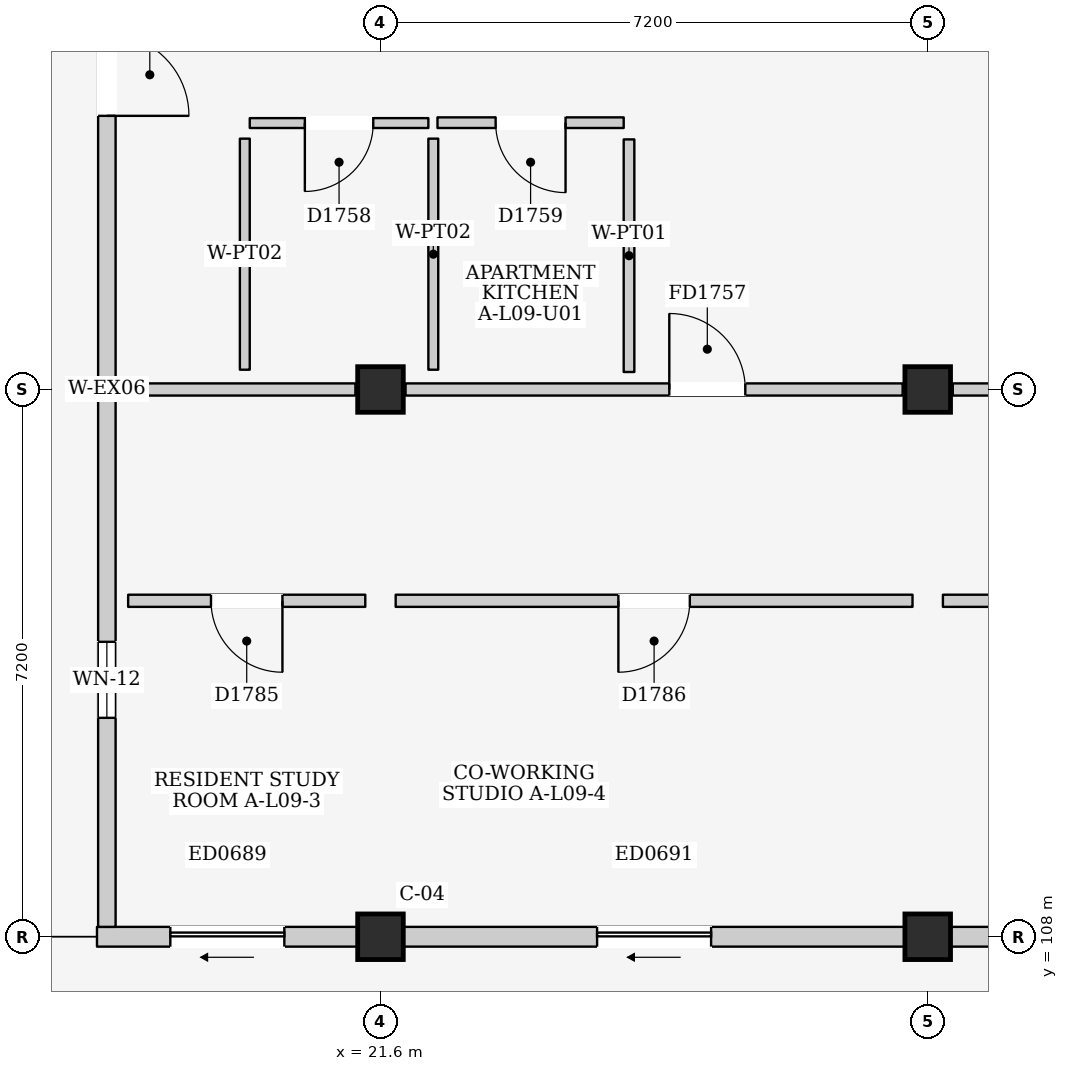
"""IFC4 building model, lengths in metres.
Left out: names, types, materials, properties, quantities, classifications, styles, units other than length and angle.
Written with IfcOpenShell. Run it as: python <this file> out.ifc"""

import sys

from ifc_helpers import new_model, si_unit, direction, frame, frame_2d, origin, origin_2d, place, context, subcontext, project, spatial, rectangle, extrude, element, fill, save


model = new_model("IFC4")
c1 = context("Model", 3, precision=1e-05, world=origin(), true_north=direction((0.0, 1.0)))
c2 = subcontext(c1, "Body", "Model", "MODEL_VIEW")
j1 = project(units=[si_unit("LENGTHUNIT", "METRE"), si_unit("PLANEANGLEUNIT", "RADIAN")], contexts=[c1])
p1 = place(None, origin())
s1 = spatial("IfcSite", under=j1, at=p1, CompositionType="ELEMENT")
p2 = place(p1, origin())
s2 = spatial("IfcBuilding", under=s1, at=p2, CompositionType="ELEMENT")
p3 = place(p2, frame((0.0, 0.0, 31.5)))
s3 = spatial("IfcBuildingStorey", under=s2, at=p3, CompositionType="ELEMENT", Elevation=31.5)
for number, where, z_axis, x_axis in (
    (1, (21.6, 108.0, 0.0), (0.0, 0.0, 1.0), (1.0, 0.0, 0.0)),
    (2, (21.6, 115.2, 0.0), (0.0, 0.0, 1.0), (1.0, 0.0, 0.0)),
    (3, (28.8, 108.0, 0.0), (0.0, 0.0, 1.0), (1.0, 0.0, 0.0)),
    (4, (28.8, 115.2, 0.0), (0.0, 0.0, 1.0), (1.0, 0.0, 0.0)),
):
    element("IfcColumn", number, at=place(p3, frame(where, z_axis=z_axis, x_axis=x_axis)), inside=s3, PredefinedType="COLUMN", context=c2, shape_type="SweptSolid", body=[
        extrude(rectangle(XDim=0.6, YDim=0.6, at=origin_2d()), origin(), (0.0, 0.0, 1.0), 3.3),
    ])
p4 = place(p3, frame((17.87, 108.0, 0.0), z_axis=(0.0, 0.0, 1.0), x_axis=(1.0, 0.0, 0.0)))
e5 = element("IfcWall", 5, at=p4, inside=s3, PredefinedType="ELEMENTEDWALL", context=c2, shape_type="SweptSolid", body=[
    extrude(rectangle(XDim=3.43, YDim=0.26, at=frame_2d((1.715, 0.0))), origin(), (0.0, 0.0, 1.0), 2.415),
])
p5 = place(p4, frame((0.965, 0.0, 0.0)))
e6 = element("IfcOpeningElement", 6, at=p5, cuts=e5, PredefinedType="OPENING", context=c2, shape_type="SweptSolid", body=[
    extrude(rectangle(XDim=1.5, YDim=2.12, at=frame_2d((0.75, 1.06))), frame((0.0, 0.145, 0.0), z_axis=(0.0, -1.0, 0.0), x_axis=(1.0, 0.0, 0.0)), (0.0, 0.0, 1.0), 0.29),
])
p6 = place(p3, frame((21.9, 108.0, 0.0), z_axis=(0.0, 0.0, 1.0), x_axis=(1.0, 0.0, 0.0)))
e7 = element("IfcWall", 7, at=p6, inside=s3, PredefinedType="ELEMENTEDWALL", context=c2, shape_type="SweptSolid", body=[
    extrude(rectangle(XDim=6.6, YDim=0.26, at=frame_2d((3.3, 0.0))), origin(), (0.0, 0.0, 1.0), 2.415),
])
p7 = place(p6, frame((2.55, 0.0, 0.0)))
e8 = element("IfcOpeningElement", 8, at=p7, cuts=e7, PredefinedType="OPENING", context=c2, shape_type="SweptSolid", body=[
    extrude(rectangle(XDim=1.5, YDim=2.12, at=frame_2d((0.75, 1.06))), frame((0.0, 0.145, 0.0), z_axis=(0.0, -1.0, 0.0), x_axis=(1.0, 0.0, 0.0)), (0.0, 0.0, 1.0), 0.29),
])
p8 = place(p3, frame((29.1, 108.0, 0.0), z_axis=(0.0, 0.0, 1.0), x_axis=(1.0, 0.0, 0.0)))
e9 = element("IfcWall", 9, at=p8, inside=s3, PredefinedType="ELEMENTEDWALL", context=c2, shape_type="SweptSolid", body=[
    extrude(rectangle(XDim=6.6, YDim=0.26, at=frame_2d((3.3, 0.0))), origin(), (0.0, 0.0, 1.0), 2.415),
])
p9 = place(p8, frame((2.55, 0.0, 0.0)))
e10 = element("IfcOpeningElement", 10, at=p9, cuts=e9, PredefinedType="OPENING", context=c2, shape_type="SweptSolid", body=[
    extrude(rectangle(XDim=1.5, YDim=2.12, at=frame_2d((0.75, 1.06))), frame((0.0, 0.145, 0.0), z_axis=(0.0, -1.0, 0.0), x_axis=(1.0, 0.0, 0.0)), (0.0, 0.0, 1.0), 0.29),
])
p10 = place(p3, frame((18.0, 108.13, 0.0), z_axis=(0.0, 0.0, 1.0), x_axis=(0.0, 1.0, 0.0)))
e11 = element("IfcWall", 11, at=p10, inside=s3, PredefinedType="ELEMENTEDWALL", context=c2, shape_type="SweptSolid", body=[
    extrude(rectangle(XDim=7.07, YDim=0.23, at=frame_2d((3.535, 0.0))), origin(), (0.0, 0.0, 1.0), 2.515),
])
p11 = place(p10, frame((2.75, 0.0, 1.1)))
e12 = element("IfcOpeningElement", 12, at=p11, cuts=e11, PredefinedType="OPENING", context=c2, shape_type="SweptSolid", body=[
    extrude(rectangle(XDim=1.0, YDim=0.9, at=frame_2d((0.5, 0.45))), frame((0.0, 0.13, 0.0), z_axis=(0.0, -1.0, 0.0), x_axis=(1.0, 0.0, 0.0)), (0.0, 0.0, 1.0), 0.26),
])
p12 = place(p3, frame((18.0, 115.2, 0.0), z_axis=(0.0, 0.0, 1.0), x_axis=(0.0, 1.0, 0.0)))
e13 = element("IfcWall", 13, at=p12, inside=s3, PredefinedType="ELEMENTEDWALL", context=c2, shape_type="SweptSolid", body=[
    extrude(rectangle(XDim=7.07, YDim=0.23, at=frame_2d((3.535, 0.0))), origin(), (0.0, 0.0, 1.0), 2.515),
])
p13 = place(p12, frame((3.6, 0.0, 0.0)))
e14 = element("IfcOpeningElement", 14, at=p13, cuts=e13, PredefinedType="OPENING", context=c2, shape_type="SweptSolid", body=[
    extrude(rectangle(XDim=1.08, YDim=2.12, at=frame_2d((0.54, 1.06))), frame((0.0, 0.13, 0.0), z_axis=(0.0, -1.0, 0.0), x_axis=(1.0, 0.0, 0.0)), (0.0, 0.0, 1.0), 0.26),
])
p14 = place(p3, frame((18.28, 115.2, 0.0), z_axis=(0.0, 0.0, 1.0), x_axis=(1.0, 0.0, 0.0)))
e15 = element("IfcWall", 15, at=p14, inside=s3, PredefinedType="PARTITIONING", context=c2, shape_type="SweptSolid", body=[
    extrude(rectangle(XDim=2.99, YDim=0.16, at=frame_2d((1.495, 0.0))), origin(), (0.0, 0.0, 1.0), 2.415),
])
p15 = place(p3, frame((21.93, 115.2, 0.0), z_axis=(0.0, 0.0, 1.0), x_axis=(1.0, 0.0, 0.0)))
e16 = element("IfcWall", 16, at=p15, inside=s3, PredefinedType="PARTITIONING", context=c2, shape_type="SweptSolid", body=[
    extrude(rectangle(XDim=6.54, YDim=0.16, at=frame_2d((3.27, 0.0))), origin(), (0.0, 0.0, 1.0), 2.415),
])
p16 = place(p15, frame((3.47, 0.0, 0.0)))
e17 = element("IfcOpeningElement", 17, at=p16, cuts=e16, PredefinedType="OPENING", context=c2, shape_type="SweptSolid", body=[
    extrude(rectangle(XDim=1.0, YDim=2.15, at=frame_2d((0.5, 1.075))), frame((0.0, 0.095, 0.0), z_axis=(0.0, -1.0, 0.0), x_axis=(1.0, 0.0, 0.0)), (0.0, 0.0, 1.0), 0.19),
])
p17 = place(p3, frame((29.13, 115.2, 0.0), z_axis=(0.0, 0.0, 1.0), x_axis=(1.0, 0.0, 0.0)))
e18 = element("IfcWall", 18, at=p17, inside=s3, PredefinedType="PARTITIONING", context=c2, shape_type="SweptSolid", body=[
    extrude(rectangle(XDim=6.54, YDim=0.16, at=frame_2d((3.27, 0.0))), origin(), (0.0, 0.0, 1.0), 2.415),
])
p18 = place(p3, frame((19.88, 118.705, 0.0), z_axis=(0.0, 0.0, 1.0), x_axis=(1.0, 0.0, 0.0)))
e19 = element("IfcWall", 19, at=p18, inside=s3, PredefinedType="PARTITIONING", context=c2, shape_type="SweptSolid", body=[
    extrude(rectangle(XDim=2.35, YDim=0.13, at=frame_2d((1.175, 0.0))), origin(), (0.0, 0.0, 1.0), 3.08),
])
p19 = place(p18, frame((0.725, 0.0, 0.0)))
e20 = element("IfcOpeningElement", 20, at=p19, cuts=e19, PredefinedType="OPENING", context=c2, shape_type="SweptSolid", body=[
    extrude(rectangle(XDim=0.9, YDim=2.1, at=frame_2d((0.45, 1.05))), frame((0.0, 0.08, 0.0), z_axis=(0.0, -1.0, 0.0), x_axis=(1.0, 0.0, 0.0)), (0.0, 0.0, 1.0), 0.16),
])
for number, where, z_axis, x_axis in (
    (21, (22.295, 115.46, 0.0), (0.0, 0.0, 1.0), (0.0, 1.0, 0.0)),
    (22, (19.815, 115.46, 0.0), (0.0, 0.0, 1.0), (0.0, 1.0, 0.0)),
):
    element("IfcWall", number, at=place(p3, frame(where, z_axis=z_axis, x_axis=x_axis)), inside=s3, PredefinedType="PARTITIONING", context=c2, shape_type="SweptSolid", body=[
        extrude(rectangle(XDim=3.04, YDim=0.13, at=frame_2d((1.52, 0.0))), origin(), (0.0, 0.0, 1.0), 3.08),
    ])
p20 = place(p3, frame((22.35, 118.71, 0.0), z_axis=(0.0, 0.0, 1.0), x_axis=(1.0, 0.0, 0.0)))
e23 = element("IfcWall", 23, at=p20, inside=s3, PredefinedType="PARTITIONING", context=c2, shape_type="SweptSolid", body=[
    extrude(rectangle(XDim=2.45, YDim=0.14, at=frame_2d((1.225, 0.0))), origin(), (0.0, 0.0, 1.0), 3.08),
])
p21 = place(p20, frame((0.765, 0.0, 0.0)))
e24 = element("IfcOpeningElement", 24, at=p21, cuts=e23, PredefinedType="OPENING", context=c2, shape_type="SweptSolid", body=[
    extrude(rectangle(XDim=0.92, YDim=2.1, at=frame_2d((0.46, 1.05))), frame((0.0, 0.085, 0.0), z_axis=(0.0, -1.0, 0.0), x_axis=(1.0, 0.0, 0.0)), (0.0, 0.0, 1.0), 0.17),
])
p22 = place(p3, frame((24.87, 115.43, 0.0), z_axis=(0.0, 0.0, 1.0), x_axis=(0.0, 1.0, 0.0)))
e25 = element("IfcWall", 25, at=p22, inside=s3, PredefinedType="PARTITIONING", context=c2, shape_type="SweptSolid", body=[
    extrude(rectangle(XDim=3.06, YDim=0.14, at=frame_2d((1.53, 0.0))), origin(), (0.0, 0.0, 1.0), 3.08),
])
p23 = place(p3, frame((18.28, 112.42, 0.0), z_axis=(0.0, 0.0, 1.0), x_axis=(1.0, 0.0, 0.0)))
e26 = element("IfcWall", 26, at=p23, inside=s3, PredefinedType="PARTITIONING", context=c2, shape_type="SweptSolid", body=[
    extrude(rectangle(XDim=3.12, YDim=0.16, at=frame_2d((1.56, 0.0))), origin(), (0.0, 0.0, 1.0), 3.08),
])
p24 = place(p23, frame((1.09, 0.0, 0.0)))
e27 = element("IfcOpeningElement", 27, at=p24, cuts=e26, PredefinedType="OPENING", context=c2, shape_type="SweptSolid", body=[
    extrude(rectangle(XDim=0.94, YDim=2.12, at=frame_2d((0.47, 1.06))), frame((0.0, 0.095, 0.0), z_axis=(0.0, -1.0, 0.0), x_axis=(1.0, 0.0, 0.0)), (0.0, 0.0, 1.0), 0.19),
])
p25 = place(p3, frame((21.8, 112.42, 0.0), z_axis=(0.0, 0.0, 1.0), x_axis=(1.0, 0.0, 0.0)))
e28 = element("IfcWall", 28, at=p25, inside=s3, PredefinedType="PARTITIONING", context=c2, shape_type="SweptSolid", body=[
    extrude(rectangle(XDim=6.8, YDim=0.16, at=frame_2d((3.4, 0.0))), origin(), (0.0, 0.0, 1.0), 3.08),
])
p26 = place(p25, frame((2.93, 0.0, 0.0)))
e29 = element("IfcOpeningElement", 29, at=p26, cuts=e28, PredefinedType="OPENING", context=c2, shape_type="SweptSolid", body=[
    extrude(rectangle(XDim=0.94, YDim=2.12, at=frame_2d((0.47, 1.06))), frame((0.0, 0.095, 0.0), z_axis=(0.0, -1.0, 0.0), x_axis=(1.0, 0.0, 0.0)), (0.0, 0.0, 1.0), 0.19),
])
p27 = place(p3, frame((29.0, 112.42, 0.0), z_axis=(0.0, 0.0, 1.0), x_axis=(1.0, 0.0, 0.0)))
e30 = element("IfcWall", 30, at=p27, inside=s3, PredefinedType="PARTITIONING", context=c2, shape_type="SweptSolid", body=[
    extrude(rectangle(XDim=6.8, YDim=0.16, at=frame_2d((3.4, 0.0))), origin(), (0.0, 0.0, 1.0), 3.08),
])
p28 = place(p27, frame((2.93, 0.0, 0.0)))
e31 = element("IfcOpeningElement", 31, at=p28, cuts=e30, PredefinedType="OPENING", context=c2, shape_type="SweptSolid", body=[
    extrude(rectangle(XDim=0.94, YDim=2.12, at=frame_2d((0.47, 1.06))), frame((0.0, 0.095, 0.0), z_axis=(0.0, -1.0, 0.0), x_axis=(1.0, 0.0, 0.0)), (0.0, 0.0, 1.0), 0.19),
])
p29 = place(p5, frame((1.5, 0.0, 0.0), z_axis=(0.0, 0.0, 1.0), x_axis=(-1.0, 0.0, 0.0)))
e32 = element("IfcDoor", 32, at=p29, inside=s3, OperationType="SLIDING_TO_LEFT", PredefinedType="DOOR", context=c2, shape_type="SweptSolid", body=[
    extrude(rectangle(XDim=1.5, YDim=2.12, at=frame_2d((0.75, 1.06))), frame((0.0, 0.025, 0.0), z_axis=(0.0, -1.0, 0.0), x_axis=(1.0, 0.0, 0.0)), (0.0, 0.0, 1.0), 0.05),
])
fill(e6, e32)
p30 = place(p7, frame((1.5, 0.0, 0.0), z_axis=(0.0, 0.0, 1.0), x_axis=(-1.0, 0.0, 0.0)))
e33 = element("IfcDoor", 33, at=p30, inside=s3, OperationType="SLIDING_TO_LEFT", PredefinedType="DOOR", context=c2, shape_type="SweptSolid", body=[
    extrude(rectangle(XDim=1.5, YDim=2.12, at=frame_2d((0.75, 1.06))), frame((0.0, 0.025, 0.0), z_axis=(0.0, -1.0, 0.0), x_axis=(1.0, 0.0, 0.0)), (0.0, 0.0, 1.0), 0.05),
])
fill(e8, e33)
p31 = place(p11, origin())
e34 = element("IfcWindow", 34, at=p31, inside=s3, PartitioningType="SINGLE_PANEL", PredefinedType="WINDOW", context=c2, shape_type="SweptSolid", body=[
    extrude(rectangle(XDim=1.0, YDim=0.9, at=frame_2d((0.5, 0.45))), frame((0.0, 0.03, 0.0), z_axis=(0.0, -1.0, 0.0), x_axis=(1.0, 0.0, 0.0)), (0.0, 0.0, 1.0), 0.06),
])
fill(e12, e34)
p32 = place(p13, frame((1.08, 0.0, 0.0), z_axis=(0.0, 0.0, 1.0), x_axis=(-1.0, 0.0, 0.0)))
e35 = element("IfcDoor", 35, at=p32, inside=s3, OperationType="SINGLE_SWING_RIGHT", PredefinedType="DOOR", context=c2, shape_type="SweptSolid", body=[
    extrude(rectangle(XDim=1.08, YDim=2.12, at=frame_2d((0.54, 1.06))), frame((0.0, 0.025, 0.0), z_axis=(0.0, -1.0, 0.0), x_axis=(1.0, 0.0, 0.0)), (0.0, 0.0, 1.0), 0.05),
])
fill(e14, e35)
p33 = place(p16, origin())
e36 = element("IfcDoor", 36, at=p33, inside=s3, OperationType="SINGLE_SWING_LEFT", PredefinedType="DOOR", context=c2, shape_type="SweptSolid", body=[
    extrude(rectangle(XDim=1.0, YDim=2.15, at=frame_2d((0.5, 1.075))), frame((0.0, 0.025, 0.0), z_axis=(0.0, -1.0, 0.0), x_axis=(1.0, 0.0, 0.0)), (0.0, 0.0, 1.0), 0.05),
])
fill(e17, e36)
p34 = place(p19, frame((0.9, 0.0, 0.0), z_axis=(0.0, 0.0, 1.0), x_axis=(-1.0, 0.0, 0.0)))
e37 = element("IfcDoor", 37, at=p34, inside=s3, OperationType="SINGLE_SWING_RIGHT", PredefinedType="DOOR", context=c2, shape_type="SweptSolid", body=[
    extrude(rectangle(XDim=0.9, YDim=2.1, at=frame_2d((0.45, 1.05))), frame((0.0, 0.025, 0.0), z_axis=(0.0, -1.0, 0.0), x_axis=(1.0, 0.0, 0.0)), (0.0, 0.0, 1.0), 0.05),
])
fill(e20, e37)
p35 = place(p21, frame((0.92, 0.0, 0.0), z_axis=(0.0, 0.0, 1.0), x_axis=(-1.0, 0.0, 0.0)))
e38 = element("IfcDoor", 38, at=p35, inside=s3, OperationType="SINGLE_SWING_LEFT", PredefinedType="DOOR", context=c2, shape_type="SweptSolid", body=[
    extrude(rectangle(XDim=0.92, YDim=2.1, at=frame_2d((0.46, 1.05))), frame((0.0, 0.025, 0.0), z_axis=(0.0, -1.0, 0.0), x_axis=(1.0, 0.0, 0.0)), (0.0, 0.0, 1.0), 0.05),
])
fill(e24, e38)
p36 = place(p24, frame((0.94, 0.0, 0.0), z_axis=(0.0, 0.0, 1.0), x_axis=(-1.0, 0.0, 0.0)))
e39 = element("IfcDoor", 39, at=p36, inside=s3, OperationType="SINGLE_SWING_LEFT", PredefinedType="DOOR", context=c2, shape_type="SweptSolid", body=[
    extrude(rectangle(XDim=0.94, YDim=2.12, at=frame_2d((0.47, 1.06))), frame((0.0, 0.025, 0.0), z_axis=(0.0, -1.0, 0.0), x_axis=(1.0, 0.0, 0.0)), (0.0, 0.0, 1.0), 0.05),
])
fill(e27, e39)
p37 = place(p26, frame((0.94, 0.0, 0.0), z_axis=(0.0, 0.0, 1.0), x_axis=(-1.0, 0.0, 0.0)))
e40 = element("IfcDoor", 40, at=p37, inside=s3, OperationType="SINGLE_SWING_RIGHT", PredefinedType="DOOR", context=c2, shape_type="SweptSolid", body=[
    extrude(rectangle(XDim=0.94, YDim=2.12, at=frame_2d((0.47, 1.06))), frame((0.0, 0.025, 0.0), z_axis=(0.0, -1.0, 0.0), x_axis=(1.0, 0.0, 0.0)), (0.0, 0.0, 1.0), 0.05),
])
fill(e29, e40)
save(model, sys.argv[1])
